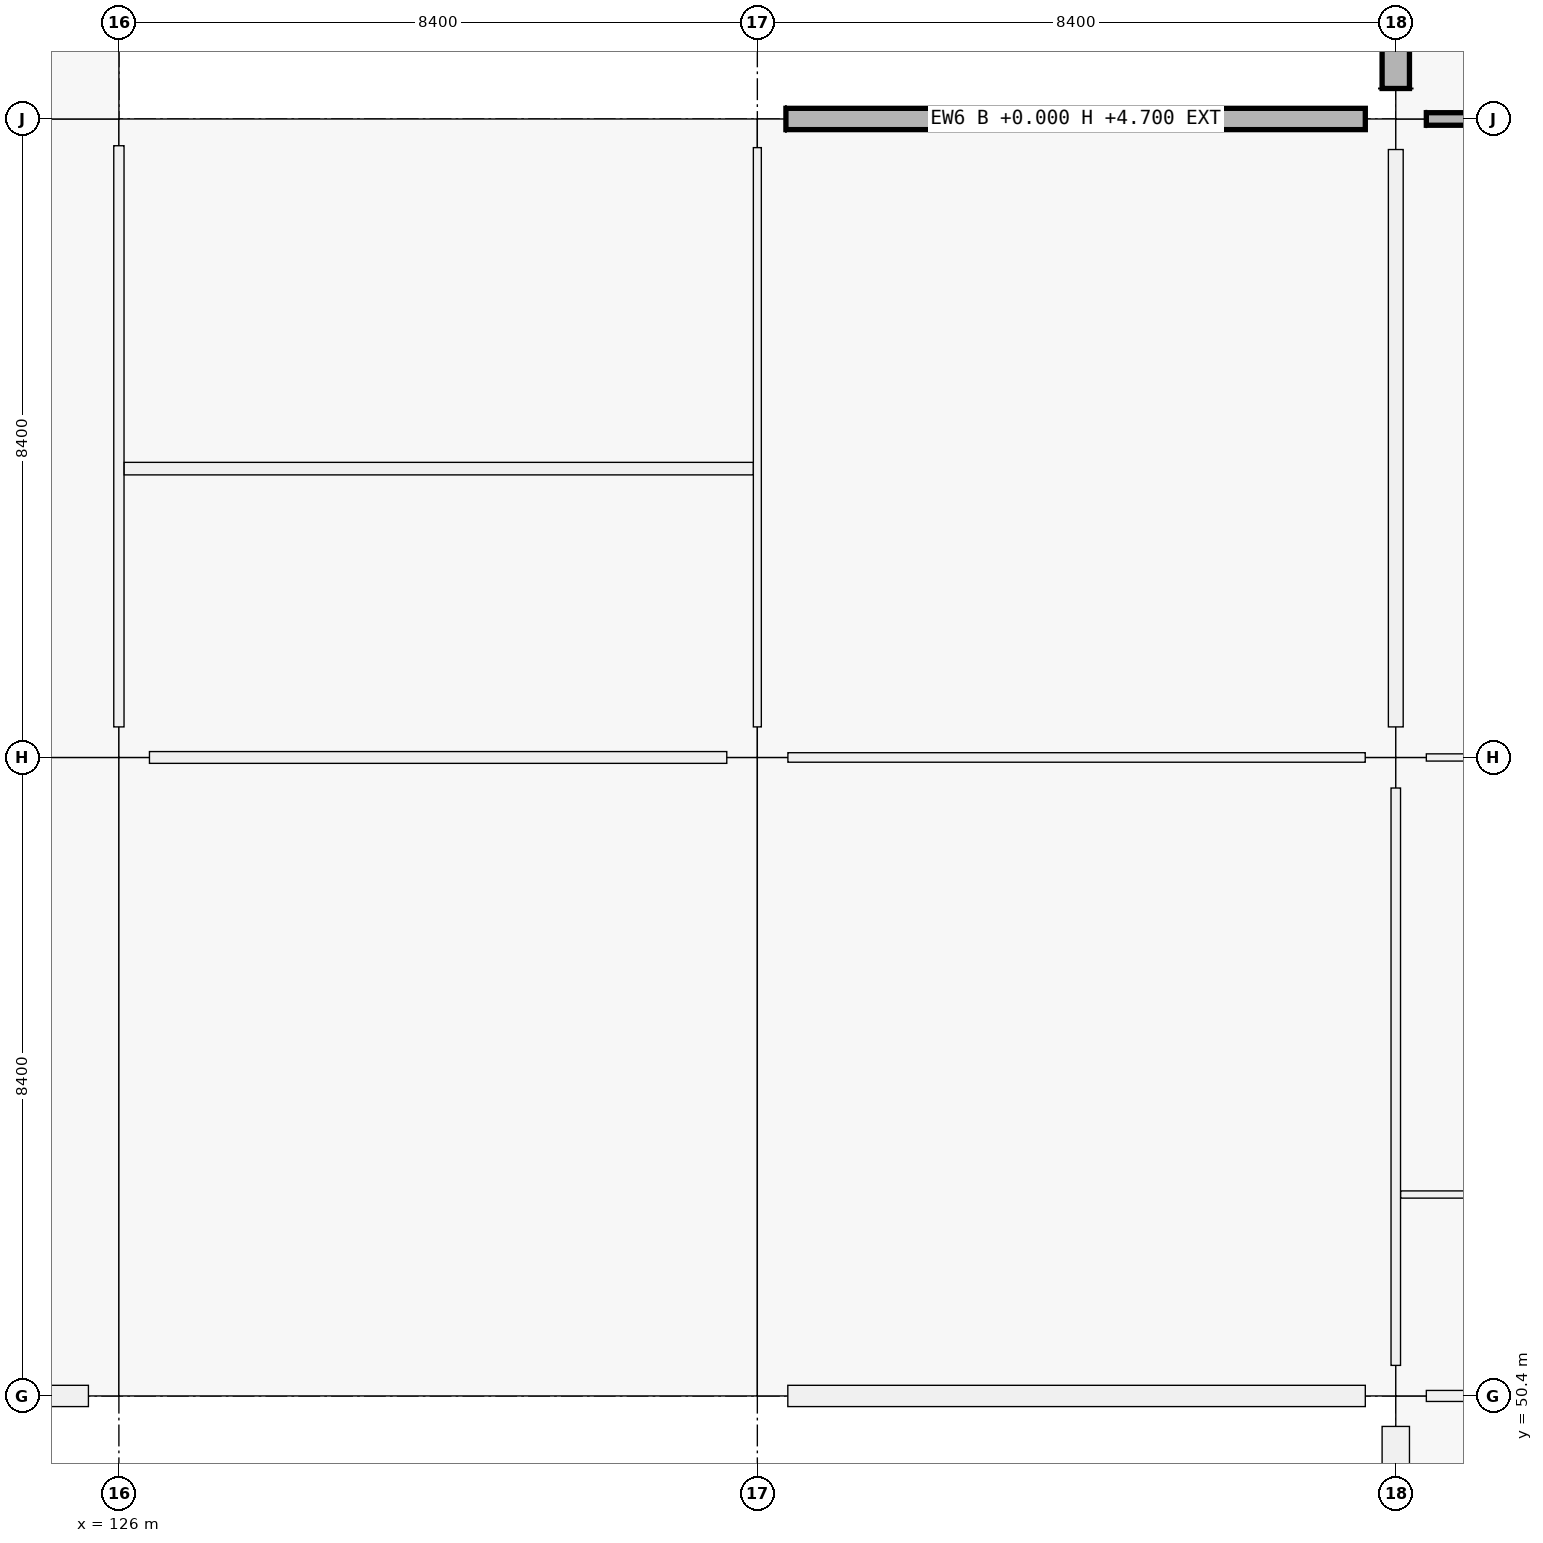
"""IFC4 building model, lengths in metres.
Left out: names, types, materials, properties, quantities, classifications, styles, units other than length and angle.
Written with IfcOpenShell. Run it as: python <this file> out.ifc"""

import sys

from ifc_helpers import new_model, si_unit, direction, frame, frame_2d, origin, origin_2d, place, context, subcontext, project, spatial, rectangle, extrude, element, fill, save


model = new_model("IFC4")
c1 = context("Model", 3, precision=1e-05, world=origin(), true_north=direction((0.0, 1.0)))
c2 = subcontext(c1, "Body", "Model", "MODEL_VIEW")
j1 = project(units=[si_unit("LENGTHUNIT", "METRE"), si_unit("PLANEANGLEUNIT", "RADIAN")], contexts=[c1])
p1 = place(None, origin())
s1 = spatial("IfcSite", under=j1, at=p1, CompositionType="ELEMENT")
p2 = place(p1, origin())
s2 = spatial("IfcBuilding", under=s1, at=p2, CompositionType="ELEMENT")
p3 = place(p2, origin())
s3 = spatial("IfcBuildingStorey", under=s2, at=p3, CompositionType="ELEMENT", Elevation=0.0)
for number, where, z_axis, x_axis in (
    (1, (126.0, 50.4, 0.0), (0.0, 0.0, 1.0), (1.0, 0.0, 0.0)),
    (2, (126.0, 58.8, 0.0), (0.0, 0.0, 1.0), (1.0, 0.0, 0.0)),
):
    element("IfcColumn", number, at=place(p3, frame(where, z_axis=z_axis, x_axis=x_axis)), inside=s3, PredefinedType="COLUMN", context=c2, shape_type="SweptSolid", body=[
        extrude(rectangle(XDim=0.8, YDim=0.8, at=origin_2d()), origin(), (0.0, 0.0, 1.0), 5.76),
    ])
p4 = place(p3, frame((126.0, 67.2, 0.0), z_axis=(0.0, 0.0, 1.0), x_axis=(1.0, 0.0, 0.0)))
e3 = element("IfcColumn", 3, at=p4, inside=s3, PredefinedType="COLUMN", context=c2, shape_type="SweptSolid", body=[
    extrude(rectangle(XDim=0.7, YDim=0.7, at=origin_2d()), origin(), (0.0, 0.0, 1.0), 5.76),
])
for number, where, z_axis, x_axis in (
    (4, (134.4, 50.4, 0.0), (0.0, 0.0, 1.0), (1.0, 0.0, 0.0)),
    (5, (134.4, 58.8, 0.0), (0.0, 0.0, 1.0), (1.0, 0.0, 0.0)),
):
    element("IfcColumn", number, at=place(p3, frame(where, z_axis=z_axis, x_axis=x_axis)), inside=s3, PredefinedType="COLUMN", context=c2, shape_type="SweptSolid", body=[
        extrude(rectangle(XDim=0.8, YDim=0.8, at=origin_2d()), origin(), (0.0, 0.0, 1.0), 5.76),
    ])
p5 = place(p3, frame((134.4, 67.2, 0.0), z_axis=(0.0, 0.0, 1.0), x_axis=(1.0, 0.0, 0.0)))
e6 = element("IfcColumn", 6, at=p5, inside=s3, PredefinedType="COLUMN", context=c2, shape_type="SweptSolid", body=[
    extrude(rectangle(XDim=0.75, YDim=0.75, at=origin_2d()), origin(), (0.0, 0.0, 1.0), 5.76),
])
for number, where, z_axis, x_axis in (
    (7, (142.8, 50.4, 0.0), (0.0, 0.0, 1.0), (1.0, 0.0, 0.0)),
    (8, (142.8, 58.8, 0.0), (0.0, 0.0, 1.0), (1.0, 0.0, 0.0)),
    (9, (142.8, 67.2, 0.0), (0.0, 0.0, 1.0), (1.0, 0.0, 0.0)),
):
    element("IfcColumn", number, at=place(p3, frame(where, z_axis=z_axis, x_axis=x_axis)), inside=s3, PredefinedType="COLUMN", context=c2, shape_type="SweptSolid", body=[
        extrude(rectangle(XDim=0.8, YDim=0.8, at=origin_2d()), origin(), (0.0, 0.0, 1.0), 5.76),
    ])
p6 = place(p3, frame((125.599, 50.4, 0.0), z_axis=(0.0, 0.0, 1.0), x_axis=(-1.0, 0.0, 0.0)))
e10 = element("IfcWall", 10, at=p6, inside=s3, PredefinedType="SOLIDWALL", context=c2, shape_type="SweptSolid", body=[
    extrude(rectangle(XDim=7.598, YDim=0.28, at=frame_2d((3.799, 0.0))), origin(), (0.0, 0.0, 1.0), 4.7),
])
p7 = place(p6, frame((2.924, 0.0, 0.9)))
e11 = element("IfcOpeningElement", 11, at=p7, cuts=e10, PredefinedType="OPENING", context=c2, shape_type="SweptSolid", body=[
    extrude(rectangle(XDim=1.75, YDim=1.95, at=frame_2d((0.875, 0.975))), frame((0.0, 0.14, 0.0), z_axis=(0.0, -1.0, 0.0), x_axis=(1.0, 0.0, 0.0)), (0.0, 0.0, 1.0), 0.28),
])
p8 = place(p3, frame((142.399, 50.4, 0.0), z_axis=(0.0, 0.0, 1.0), x_axis=(-1.0, 0.0, 0.0)))
e12 = element("IfcWall", 12, at=p8, inside=s3, PredefinedType="SOLIDWALL", context=c2, shape_type="SweptSolid", body=[
    extrude(rectangle(XDim=7.598, YDim=0.28, at=frame_2d((3.799, 0.0))), origin(), (0.0, 0.0, 1.0), 4.7),
])
p9 = place(p3, frame((134.776, 67.2, 0.0), z_axis=(0.0, 0.0, 1.0), x_axis=(1.0, 0.0, 0.0)))
e13 = element("IfcWall", 13, at=p9, inside=s3, PredefinedType="SOLIDWALL", context=c2, shape_type="SweptSolid", body=[
    extrude(rectangle(XDim=7.623, YDim=0.28, at=frame_2d((3.812, 0.0))), origin(), (0.0, 0.0, 1.0), 4.7),
])
p10 = place(p9, frame((2.537, 0.0, 0.9)))
e14 = element("IfcOpeningElement", 14, at=p10, cuts=e13, PredefinedType="OPENING", context=c2, shape_type="SweptSolid", body=[
    extrude(rectangle(XDim=2.55, YDim=1.95, at=frame_2d((1.275, 0.975))), frame((0.0, 0.14, 0.0), z_axis=(0.0, -1.0, 0.0), x_axis=(1.0, 0.0, 0.0)), (0.0, 0.0, 1.0), 0.28),
])
p11 = place(p3, frame((142.8, 42.401, 0.0), z_axis=(0.0, 0.0, 1.0), x_axis=(0.0, 1.0, 0.0)))
e15 = element("IfcWall", 15, at=p11, inside=s3, PredefinedType="SOLIDWALL", context=c2, shape_type="SweptSolid", body=[
    extrude(rectangle(XDim=7.598, YDim=0.36, at=frame_2d((3.799, 0.0))), origin(), (0.0, 0.0, 1.0), 4.7),
])
p12 = place(p11, frame((2.574, 0.0, 0.9)))
e16 = element("IfcOpeningElement", 16, at=p12, cuts=e15, PredefinedType="OPENING", context=c2, shape_type="SweptSolid", body=[
    extrude(rectangle(XDim=2.45, YDim=1.45, at=frame_2d((1.225, 0.725))), frame((0.0, 0.18, 0.0), z_axis=(0.0, -1.0, 0.0), x_axis=(1.0, 0.0, 0.0)), (0.0, 0.0, 1.0), 0.36),
])
p13 = place(p3, frame((142.8, 67.601, 0.0), z_axis=(0.0, 0.0, 1.0), x_axis=(0.0, 1.0, 0.0)))
e17 = element("IfcWall", 17, at=p13, inside=s3, PredefinedType="SOLIDWALL", context=c2, shape_type="SweptSolid", body=[
    extrude(rectangle(XDim=7.673, YDim=0.36, at=frame_2d((3.836, 0.0))), origin(), (0.0, 0.0, 1.0), 4.7),
])
p14 = place(p13, frame((2.937, 0.0, 0.9)))
e18 = element("IfcOpeningElement", 18, at=p14, cuts=e17, PredefinedType="OPENING", context=c2, shape_type="SweptSolid", body=[
    extrude(rectangle(XDim=1.8, YDim=1.8, at=frame_2d((0.9, 0.9))), frame((0.0, 0.18, 0.0), z_axis=(0.0, -1.0, 0.0), x_axis=(1.0, 0.0, 0.0)), (0.0, 0.0, 1.0), 0.36),
])
p15 = place(p3, frame((126.402, 58.8, 0.0), z_axis=(0.0, 0.0, 1.0), x_axis=(1.0, 0.0, 0.0)))
e19 = element("IfcWall", 19, at=p15, inside=s3, PredefinedType="PARTITIONING", context=c2, shape_type="SweptSolid", body=[
    extrude(rectangle(XDim=7.596, YDim=0.155, at=frame_2d((3.798, 0.0))), origin(), (0.0, 0.0, 1.0), 3.66),
])
p16 = place(p3, frame((134.802, 58.8, 0.0), z_axis=(0.0, 0.0, 1.0), x_axis=(1.0, 0.0, 0.0)))
e20 = element("IfcWall", 20, at=p16, inside=s3, PredefinedType="PARTITIONING", context=c2, shape_type="SweptSolid", body=[
    extrude(rectangle(XDim=7.596, YDim=0.125, at=frame_2d((3.798, 0.0))), origin(), (0.0, 0.0, 1.0), 3.66),
])
p17 = place(p16, frame((3.293, 0.0, 0.0)))
e21 = element("IfcOpeningElement", 21, at=p17, cuts=e20, PredefinedType="OPENING", context=c2, shape_type="SweptSolid", body=[
    extrude(rectangle(XDim=1.01, YDim=2.12, at=frame_2d((0.505, 1.06))), frame((0.0, 0.062, 0.0), z_axis=(0.0, -1.0, 0.0), x_axis=(1.0, 0.0, 0.0)), (0.0, 0.0, 1.0), 0.125),
])
p18 = place(p3, frame((143.202, 50.4, 0.0), z_axis=(0.0, 0.0, 1.0), x_axis=(1.0, 0.0, 0.0)))
e22 = element("IfcWall", 22, at=p18, inside=s3, PredefinedType="PARTITIONING", context=c2, shape_type="SweptSolid", body=[
    extrude(rectangle(XDim=7.596, YDim=0.145, at=frame_2d((3.798, 0.0))), origin(), (0.0, 0.0, 1.0), 3.66),
])
p19 = place(p3, frame((143.202, 58.8, 0.0), z_axis=(0.0, 0.0, 1.0), x_axis=(1.0, 0.0, 0.0)))
e23 = element("IfcWall", 23, at=p19, inside=s3, PredefinedType="PARTITIONING", context=c2, shape_type="SweptSolid", body=[
    extrude(rectangle(XDim=7.596, YDim=0.095, at=frame_2d((3.798, 0.0))), origin(), (0.0, 0.0, 1.0), 3.66),
])
p20 = place(p3, frame((143.202, 67.2, 0.0), z_axis=(0.0, 0.0, 1.0), x_axis=(1.0, 0.0, 0.0)))
e24 = element("IfcWall", 24, at=p20, inside=s3, PredefinedType="PARTITIONING", context=c2, shape_type="SweptSolid", body=[
    extrude(rectangle(XDim=7.596, YDim=0.165, at=frame_2d((3.798, 0.0))), origin(), (0.0, 0.0, 1.0), 3.66),
])
p21 = place(p20, frame((3.278, 0.0, 0.0)))
e25 = element("IfcOpeningElement", 25, at=p21, cuts=e24, PredefinedType="OPENING", context=c2, shape_type="SweptSolid", body=[
    extrude(rectangle(XDim=1.04, YDim=2.2, at=frame_2d((0.52, 1.1))), frame((0.0, 0.083, 0.0), z_axis=(0.0, -1.0, 0.0), x_axis=(1.0, 0.0, 0.0)), (0.0, 0.0, 1.0), 0.165),
])
p22 = place(p3, frame((126.0, 59.202, 0.0), z_axis=(0.0, 0.0, 1.0), x_axis=(0.0, 1.0, 0.0)))
e26 = element("IfcWall", 26, at=p22, inside=s3, PredefinedType="PARTITIONING", context=c2, shape_type="SweptSolid", body=[
    extrude(rectangle(XDim=7.646, YDim=0.135, at=frame_2d((3.823, 0.0))), origin(), (0.0, 0.0, 1.0), 3.66),
])
p23 = place(p22, frame((1.153, 0.0, 0.0)))
e27 = element("IfcOpeningElement", 27, at=p23, cuts=e26, PredefinedType="OPENING", context=c2, shape_type="SweptSolid", body=[
    extrude(rectangle(XDim=0.97, YDim=2.12, at=frame_2d((0.485, 1.06))), frame((0.0, 0.067, 0.0), z_axis=(0.0, -1.0, 0.0), x_axis=(1.0, 0.0, 0.0)), (0.0, 0.0, 1.0), 0.135),
])
p24 = place(p22, frame((5.093, 0.0, 0.0)))
e28 = element("IfcOpeningElement", 28, at=p24, cuts=e26, PredefinedType="OPENING", context=c2, shape_type="SweptSolid", body=[
    extrude(rectangle(XDim=0.93, YDim=2.12, at=frame_2d((0.465, 1.06))), frame((0.0, 0.067, 0.0), z_axis=(0.0, -1.0, 0.0), x_axis=(1.0, 0.0, 0.0)), (0.0, 0.0, 1.0), 0.135),
])
p25 = place(p3, frame((134.4, 59.202, 0.0), z_axis=(0.0, 0.0, 1.0), x_axis=(0.0, 1.0, 0.0)))
e29 = element("IfcWall", 29, at=p25, inside=s3, PredefinedType="PARTITIONING", context=c2, shape_type="SweptSolid", body=[
    extrude(rectangle(XDim=7.621, YDim=0.105, at=frame_2d((3.811, 0.0))), origin(), (0.0, 0.0, 1.0), 3.66),
])
p26 = place(p3, frame((142.8, 50.802, 0.0), z_axis=(0.0, 0.0, 1.0), x_axis=(0.0, 1.0, 0.0)))
e30 = element("IfcWall", 30, at=p26, inside=s3, PredefinedType="PARTITIONING", context=c2, shape_type="SweptSolid", body=[
    extrude(rectangle(XDim=7.596, YDim=0.125, at=frame_2d((3.798, 0.0))), origin(), (0.0, 0.0, 1.0), 3.66),
])
p27 = place(p26, frame((0.593, 0.0, 0.0)))
e31 = element("IfcOpeningElement", 31, at=p27, cuts=e30, PredefinedType="OPENING", context=c2, shape_type="SweptSolid", body=[
    extrude(rectangle(XDim=0.94, YDim=2.08, at=frame_2d((0.47, 1.04))), frame((0.0, 0.062, 0.0), z_axis=(0.0, -1.0, 0.0), x_axis=(1.0, 0.0, 0.0)), (0.0, 0.0, 1.0), 0.125),
])
p28 = place(p26, frame((4.503, 0.0, 0.0)))
e32 = element("IfcOpeningElement", 32, at=p28, cuts=e30, PredefinedType="OPENING", context=c2, shape_type="SweptSolid", body=[
    extrude(rectangle(XDim=0.96, YDim=2.1, at=frame_2d((0.48, 1.05))), frame((0.0, 0.062, 0.0), z_axis=(0.0, -1.0, 0.0), x_axis=(1.0, 0.0, 0.0)), (0.0, 0.0, 1.0), 0.125),
])
p29 = place(p3, frame((142.8, 59.202, 0.0), z_axis=(0.0, 0.0, 1.0), x_axis=(0.0, 1.0, 0.0)))
e33 = element("IfcWall", 33, at=p29, inside=s3, PredefinedType="PARTITIONING", context=c2, shape_type="SweptSolid", body=[
    extrude(rectangle(XDim=7.596, YDim=0.195, at=frame_2d((3.798, 0.0))), origin(), (0.0, 0.0, 1.0), 3.66),
])
p30 = place(p29, frame((3.268, 0.0, 0.0)))
e34 = element("IfcOpeningElement", 34, at=p30, cuts=e33, PredefinedType="OPENING", context=c2, shape_type="SweptSolid", body=[
    extrude(rectangle(XDim=1.06, YDim=2.25, at=frame_2d((0.53, 1.125))), frame((0.0, 0.098, 0.0), z_axis=(0.0, -1.0, 0.0), x_axis=(1.0, 0.0, 0.0)), (0.0, 0.0, 1.0), 0.195),
])
p31 = place(p3, frame((126.07, 62.6, 0.0), z_axis=(0.0, 0.0, 1.0), x_axis=(1.0, 0.0, 0.0)))
e35 = element("IfcWall", 35, at=p31, inside=s3, PredefinedType="PARTITIONING", context=c2, shape_type="SweptSolid", body=[
    extrude(rectangle(XDim=8.276, YDim=0.165, at=frame_2d((4.138, 0.0))), origin(), (0.0, 0.0, 1.0), 3.66),
])
p32 = place(p3, frame((142.865, 53.05, 0.0), z_axis=(0.0, 0.0, 1.0), x_axis=(1.0, 0.0, 0.0)))
e36 = element("IfcWall", 36, at=p32, inside=s3, PredefinedType="PARTITIONING", context=c2, shape_type="SweptSolid", body=[
    extrude(rectangle(XDim=8.286, YDim=0.095, at=frame_2d((4.143, 0.0))), origin(), (0.0, 0.0, 1.0), 3.66),
])
p33 = place(p10, origin())
e37 = element("IfcWindow", 37, at=p33, inside=s3, PartitioningType="SINGLE_PANEL", PredefinedType="WINDOW", context=c2, shape_type="SweptSolid", body=[
    extrude(rectangle(XDim=2.55, YDim=1.95, at=frame_2d((1.275, 0.975))), frame((0.0, 0.03, 0.0), z_axis=(0.0, -1.0, 0.0), x_axis=(1.0, 0.0, 0.0)), (0.0, 0.0, 1.0), 0.06),
])
fill(e14, e37)
p34 = place(p23, origin())
e38 = element("IfcDoor", 38, at=p34, inside=s3, OperationType="SINGLE_SWING_LEFT", PredefinedType="DOOR", context=c2, shape_type="SweptSolid", body=[
    extrude(rectangle(XDim=0.97, YDim=2.12, at=frame_2d((0.485, 1.06))), frame((0.0, 0.025, 0.0), z_axis=(0.0, -1.0, 0.0), x_axis=(1.0, 0.0, 0.0)), (0.0, 0.0, 1.0), 0.05),
])
fill(e27, e38)
p35 = place(p24, origin())
e39 = element("IfcDoor", 39, at=p35, inside=s3, OperationType="SINGLE_SWING_RIGHT", PredefinedType="DOOR", context=c2, shape_type="SweptSolid", body=[
    extrude(rectangle(XDim=0.93, YDim=2.12, at=frame_2d((0.465, 1.06))), frame((0.0, 0.025, 0.0), z_axis=(0.0, -1.0, 0.0), x_axis=(1.0, 0.0, 0.0)), (0.0, 0.0, 1.0), 0.05),
])
fill(e28, e39)
p36 = place(p27, origin())
e40 = element("IfcDoor", 40, at=p36, inside=s3, OperationType="SINGLE_SWING_LEFT", PredefinedType="DOOR", context=c2, shape_type="SweptSolid", body=[
    extrude(rectangle(XDim=0.94, YDim=2.08, at=frame_2d((0.47, 1.04))), frame((0.0, 0.025, 0.0), z_axis=(0.0, -1.0, 0.0), x_axis=(1.0, 0.0, 0.0)), (0.0, 0.0, 1.0), 0.05),
])
fill(e31, e40)
p37 = place(p28, origin())
e41 = element("IfcDoor", 41, at=p37, inside=s3, OperationType="SINGLE_SWING_RIGHT", PredefinedType="DOOR", context=c2, shape_type="SweptSolid", body=[
    extrude(rectangle(XDim=0.96, YDim=2.1, at=frame_2d((0.48, 1.05))), frame((0.0, 0.025, 0.0), z_axis=(0.0, -1.0, 0.0), x_axis=(1.0, 0.0, 0.0)), (0.0, 0.0, 1.0), 0.05),
])
fill(e32, e41)
p38 = place(p17, origin())
e42 = element("IfcDoor", 42, at=p38, inside=s3, OperationType="SINGLE_SWING_LEFT", PredefinedType="DOOR", context=c2, shape_type="SweptSolid", body=[
    extrude(rectangle(XDim=1.01, YDim=2.12, at=frame_2d((0.505, 1.06))), frame((0.0, 0.025, 0.0), z_axis=(0.0, -1.0, 0.0), x_axis=(1.0, 0.0, 0.0)), (0.0, 0.0, 1.0), 0.05),
])
fill(e21, e42)
p39 = place(p30, origin())
e43 = element("IfcDoor", 43, at=p39, inside=s3, OperationType="SINGLE_SWING_LEFT", PredefinedType="DOOR", context=c2, shape_type="SweptSolid", body=[
    extrude(rectangle(XDim=1.06, YDim=2.25, at=frame_2d((0.53, 1.125))), frame((0.0, 0.025, 0.0), z_axis=(0.0, -1.0, 0.0), x_axis=(1.0, 0.0, 0.0)), (0.0, 0.0, 1.0), 0.05),
])
fill(e34, e43)
save(model, sys.argv[1])
